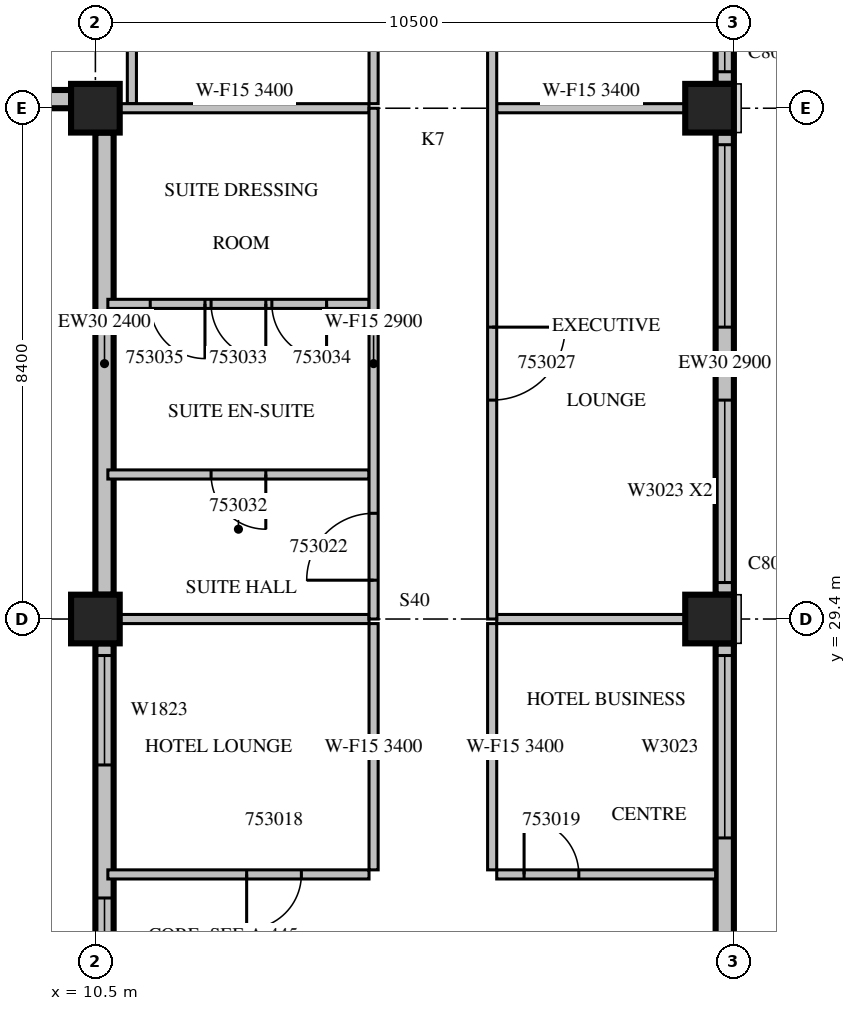
"""IFC4 building model, lengths in metres.
Left out: names, types, materials, properties, quantities, classifications, styles, units other than length and angle.
Written with IfcOpenShell. Run it as: python <this file> out.ifc"""

import sys

from ifc_helpers import new_model, si_unit, direction, frame, frame_2d, origin, origin_2d, place, context, subcontext, project, spatial, rectangle, extrude, source, transform, mapped, element, fill, save


model = new_model("IFC4")
c1 = context("Model", 3, precision=1e-05, world=origin(), true_north=direction((0.0, 1.0)))
c2 = subcontext(c1, "Body", "Model", "MODEL_VIEW")
j1 = project(units=[si_unit("LENGTHUNIT", "METRE"), si_unit("PLANEANGLEUNIT", "RADIAN")], contexts=[c1])
p1 = place(None, origin())
s1 = spatial("IfcSite", under=j1, at=p1, CompositionType="ELEMENT")
p2 = place(p1, origin())
s2 = spatial("IfcBuilding", under=s1, at=p2, CompositionType="ELEMENT")
p3 = place(p2, frame((0.0, 0.0, 234.8)))
s3 = spatial("IfcBuildingStorey", under=s2, at=p3, CompositionType="ELEMENT", Elevation=234.8)
m1 = source(origin(), c2, "Body", "SweptSolid", [
    extrude(rectangle(XDim=0.8, YDim=0.8, at=origin_2d()), origin(), (0.0, 0.0, 1.0), 3.8),
])
for number, where, z_axis, x_axis in (
    (1, (10.5, 29.4, 0.0), (0.0, 0.0, 1.0), (1.0, 0.0, 0.0)),
    (2, (20.6, 29.4, 0.0), (0.0, 0.0, 1.0), (1.0, 0.0, 0.0)),
    (3, (10.5, 37.8, 0.0), (0.0, 0.0, 1.0), (1.0, 0.0, 0.0)),
    (4, (20.6, 37.8, 0.0), (0.0, 0.0, 1.0), (1.0, 0.0, 0.0)),
):
    element("IfcColumn", number, at=place(p3, frame(where, z_axis=z_axis, x_axis=x_axis)), inside=s3, PredefinedType="COLUMN", context=c2, shape_type="MappedRepresentation", body=[
        mapped(m1, transform((0.0, 0.0, 0.0), scale=1.0)),
    ])
m2 = source(origin(), c2, "Body", "SweptSolid", [
    extrude(rectangle(XDim=7.2, YDim=0.3, at=frame_2d((3.6, 0.0))), origin(), (0.0, 0.0, 1.0), 3.4),
])
p4 = place(p3, frame((20.85, 21.8, 0.0), z_axis=(0.0, 0.0, 1.0), x_axis=(0.0, 1.0, 0.0)))
e5 = element("IfcWall", 5, at=p4, inside=s3, PredefinedType="STANDARD", context=c2, shape_type="MappedRepresentation", body=[
    mapped(m2, transform((0.0, 0.0, 0.0), scale=1.0)),
])
m3 = source(origin(), c2, "Body", "SweptSolid", [
    extrude(rectangle(XDim=1.8, YDim=2.3, at=frame_2d((0.9, 1.15))), frame((0.0, 0.16, 0.0), z_axis=(0.0, -1.0, 0.0), x_axis=(1.0, 0.0, 0.0)), (0.0, 0.0, 1.0), 0.32),
])
p5 = place(p4, frame((0.4, 0.0, 0.6)))
e6 = element("IfcOpeningElement", 6, at=p5, cuts=e5, PredefinedType="OPENING", context=c2, shape_type="MappedRepresentation", body=[
    mapped(m3, transform((0.0, 0.0, 0.0), scale=1.0)),
])
m4 = source(origin(), c2, "Body", "SweptSolid", [
    extrude(rectangle(XDim=3.0, YDim=2.3, at=frame_2d((1.5, 1.15))), frame((0.0, 0.16, 0.0), z_axis=(0.0, -1.0, 0.0), x_axis=(1.0, 0.0, 0.0)), (0.0, 0.0, 1.0), 0.32),
])
p6 = place(p4, frame((4.0, 0.0, 0.6)))
e7 = element("IfcOpeningElement", 7, at=p6, cuts=e5, PredefinedType="OPENING", context=c2, shape_type="MappedRepresentation", body=[
    mapped(m4, transform((0.0, 0.0, 0.0), scale=1.0)),
])
m5 = source(origin(), c2, "Body", "SweptSolid", [
    extrude(rectangle(XDim=7.6, YDim=0.3, at=frame_2d((3.8, 0.0))), origin(), (0.0, 0.0, 1.0), 2.9),
])
p7 = place(p3, frame((20.85, 29.8, 0.0), z_axis=(0.0, 0.0, 1.0), x_axis=(0.0, 1.0, 0.0)))
e8 = element("IfcWall", 8, at=p7, inside=s3, PredefinedType="STANDARD", context=c2, shape_type="MappedRepresentation", body=[
    mapped(m5, transform((0.0, 0.0, 0.0), scale=1.0)),
])
p8 = place(p7, frame((0.2, 0.0, 0.6)))
e9 = element("IfcOpeningElement", 9, at=p8, cuts=e8, PredefinedType="OPENING", context=c2, shape_type="MappedRepresentation", body=[
    mapped(m4, transform((0.0, 0.0, 0.0), scale=1.0)),
])
p9 = place(p7, frame((4.4, 0.0, 0.6)))
e10 = element("IfcOpeningElement", 10, at=p9, cuts=e8, PredefinedType="OPENING", context=c2, shape_type="MappedRepresentation", body=[
    mapped(m4, transform((0.0, 0.0, 0.0), scale=1.0)),
])
m6 = source(origin(), c2, "Body", "SweptSolid", [
    extrude(rectangle(XDim=7.6, YDim=0.3, at=frame_2d((3.8, 0.0))), origin(), (0.0, 0.0, 1.0), 3.4),
])
p10 = place(p3, frame((20.85, 38.2, 0.0), z_axis=(0.0, 0.0, 1.0), x_axis=(0.0, 1.0, 0.0)))
e11 = element("IfcWall", 11, at=p10, inside=s3, PredefinedType="STANDARD", context=c2, shape_type="MappedRepresentation", body=[
    mapped(m6, transform((0.0, 0.0, 0.0), scale=1.0)),
])
p11 = place(p10, frame((0.2, 0.0, 0.6)))
e12 = element("IfcOpeningElement", 12, at=p11, cuts=e11, PredefinedType="OPENING", context=c2, shape_type="MappedRepresentation", body=[
    mapped(m4, transform((0.0, 0.0, 0.0), scale=1.0)),
])
p12 = place(p10, frame((4.4, 0.0, 0.6)))
e13 = element("IfcOpeningElement", 13, at=p12, cuts=e11, PredefinedType="OPENING", context=c2, shape_type="MappedRepresentation", body=[
    mapped(m4, transform((0.0, 0.0, 0.0), scale=1.0)),
])
m7 = source(origin(), c2, "Body", "SweptSolid", [
    extrude(rectangle(XDim=1.4, YDim=0.3, at=frame_2d((0.7, 0.0))), origin(), (0.0, 0.0, 1.0), 3.4),
])
p13 = place(p3, frame((8.7, 37.95, 0.0), z_axis=(0.0, 0.0, 1.0), x_axis=(1.0, 0.0, 0.0)))
e14 = element("IfcWall", 14, at=p13, inside=s3, PredefinedType="STANDARD", context=c2, shape_type="MappedRepresentation", body=[
    mapped(m7, transform((0.0, 0.0, 0.0), scale=1.0)),
])
p14 = place(p3, frame((10.65, 37.4, 0.0), z_axis=(0.0, 0.0, 1.0), x_axis=(0.0, -1.0, 0.0)))
e15 = element("IfcWall", 15, at=p14, inside=s3, PredefinedType="STANDARD", context=c2, shape_type="SweptSolid", body=[
    extrude(rectangle(XDim=7.6, YDim=0.3, at=frame_2d((3.8, 0.0))), origin(), (0.0, 0.0, 1.0), 2.4),
])
p15 = place(p3, frame((10.65, 29.0, 0.0), z_axis=(0.0, 0.0, 1.0), x_axis=(0.0, -1.0, 0.0)))
e16 = element("IfcWall", 16, at=p15, inside=s3, PredefinedType="STANDARD", context=c2, shape_type="MappedRepresentation", body=[
    mapped(m2, transform((0.0, 0.0, 0.0), scale=1.0)),
])
p16 = place(p15, frame((0.2, 0.0, 0.6)))
e17 = element("IfcOpeningElement", 17, at=p16, cuts=e16, PredefinedType="OPENING", context=c2, shape_type="MappedRepresentation", body=[
    mapped(m3, transform((0.0, 0.0, 0.0), scale=1.0)),
])
m8 = source(origin(), c2, "Body", "SweptSolid", [
    extrude(rectangle(XDim=2.4, YDim=2.3, at=frame_2d((1.2, 1.15))), frame((0.0, 0.16, 0.0), z_axis=(0.0, -1.0, 0.0), x_axis=(1.0, 0.0, 0.0)), (0.0, 0.0, 1.0), 0.32),
])
p17 = place(p15, frame((4.188, 0.0, 0.6)))
e18 = element("IfcOpeningElement", 18, at=p17, cuts=e16, PredefinedType="OPENING", context=c2, shape_type="MappedRepresentation", body=[
    mapped(m8, transform((0.0, 0.0, 0.0), scale=1.0)),
])
m9 = source(origin(), c2, "Body", "SweptSolid", [
    extrude(rectangle(XDim=4.295, YDim=0.15, at=frame_2d((2.147, 0.0))), origin(), (0.0, 0.0, 1.0), 3.4),
])
p18 = place(p3, frame((10.705, 25.2, 0.0), z_axis=(0.0, 0.0, 1.0), x_axis=(1.0, 0.0, 0.0)))
e19 = element("IfcWall", 19, at=p18, inside=s3, PredefinedType="PARTITIONING", context=c2, shape_type="MappedRepresentation", body=[
    mapped(m9, transform((0.0, 0.0, 0.0), scale=1.0)),
])
m10 = source(origin(), c2, "Body", "SweptSolid", [
    extrude(rectangle(XDim=0.9, YDim=2.1, at=frame_2d((0.45, 1.05))), frame((0.0, 0.085, 0.0), z_axis=(0.0, -1.0, 0.0), x_axis=(1.0, 0.0, 0.0)), (0.0, 0.0, 1.0), 0.17),
])
p19 = place(p18, frame((2.283, 0.0, 0.0)))
e20 = element("IfcOpeningElement", 20, at=p19, cuts=e19, PredefinedType="OPENING", context=c2, shape_type="MappedRepresentation", body=[
    mapped(m10, transform((0.0, 0.0, 0.0), scale=1.0)),
])
m11 = source(origin(), c2, "Body", "SweptSolid", [
    extrude(rectangle(XDim=3.6, YDim=0.15, at=frame_2d((1.8, 0.0))), origin(), (0.0, 0.0, 1.0), 3.4),
])
p20 = place(p3, frame((17.1, 25.2, 0.0), z_axis=(0.0, 0.0, 1.0), x_axis=(1.0, 0.0, 0.0)))
e21 = element("IfcWall", 21, at=p20, inside=s3, PredefinedType="PARTITIONING", context=c2, shape_type="MappedRepresentation", body=[
    mapped(m11, transform((0.0, 0.0, 0.0), scale=1.0)),
])
p21 = place(p20, frame((0.45, 0.0, 0.0)))
e22 = element("IfcOpeningElement", 22, at=p21, cuts=e21, PredefinedType="OPENING", context=c2, shape_type="MappedRepresentation", body=[
    mapped(m10, transform((0.0, 0.0, 0.0), scale=1.0)),
])
m12 = source(origin(), c2, "Body", "SweptSolid", [
    extrude(rectangle(XDim=4.05, YDim=0.15, at=frame_2d((2.025, 0.0))), origin(), (0.0, 0.0, 1.0), 3.4),
])
for number, where, z_axis, x_axis in (
    (23, (15.075, 25.275, 0.0), (0.0, 0.0, 1.0), (0.0, 1.0, 0.0)),
    (24, (17.025, 29.325, 0.0), (0.0, 0.0, 1.0), (0.0, -1.0, 0.0)),
):
    element("IfcWall", number, at=place(p3, frame(where, z_axis=z_axis, x_axis=x_axis)), inside=s3, PredefinedType="PARTITIONING", context=c2, shape_type="MappedRepresentation", body=[
        mapped(m12, transform((0.0, 0.0, 0.0), scale=1.0)),
    ])
m13 = source(origin(), c2, "Body", "SweptSolid", [
    extrude(rectangle(XDim=4.101, YDim=0.15, at=frame_2d((2.05, 0.0))), origin(), (0.0, 0.0, 1.0), 3.4),
])
p22 = place(p3, frame((15.0, 29.4, 0.0), z_axis=(0.0, 0.0, 1.0), x_axis=(-1.0, 0.0, 0.0)))
e25 = element("IfcWall", 25, at=p22, inside=s3, PredefinedType="PARTITIONING", context=c2, shape_type="MappedRepresentation", body=[
    mapped(m13, transform((0.0, 0.0, 0.0), scale=1.0)),
])
m14 = source(origin(), c2, "Body", "SweptSolid", [
    extrude(rectangle(XDim=3.101, YDim=0.15, at=frame_2d((1.55, 0.0))), origin(), (0.0, 0.0, 1.0), 3.4),
])
p23 = place(p3, frame((20.201, 29.4, 0.0), z_axis=(0.0, 0.0, 1.0), x_axis=(-1.0, 0.0, 0.0)))
e26 = element("IfcWall", 26, at=p23, inside=s3, PredefinedType="PARTITIONING", context=c2, shape_type="MappedRepresentation", body=[
    mapped(m14, transform((0.0, 0.0, 0.0), scale=1.0)),
])
m15 = source(origin(), c2, "Body", "SweptSolid", [
    extrude(rectangle(XDim=6.45, YDim=0.15, at=frame_2d((3.225, 0.0))), origin(), (0.0, 0.0, 1.0), 3.4),
])
p24 = place(p3, frame((11.1, 44.325, 0.0), z_axis=(0.0, 0.0, 1.0), x_axis=(0.0, -1.0, 0.0)))
e27 = element("IfcWall", 27, at=p24, inside=s3, PredefinedType="PARTITIONING", context=c2, shape_type="MappedRepresentation", body=[
    mapped(m15, transform((0.0, 0.0, 0.0), scale=1.0)),
])
p25 = place(p3, frame((15.075, 37.875, 0.0), z_axis=(0.0, 0.0, 1.0), x_axis=(0.0, 1.0, 0.0)))
e28 = element("IfcWall", 28, at=p25, inside=s3, PredefinedType="PARTITIONING", context=c2, shape_type="MappedRepresentation", body=[
    mapped(m15, transform((0.0, 0.0, 0.0), scale=1.0)),
])
p26 = place(p25, frame((2.737, 0.0, 0.0)))
e29 = element("IfcOpeningElement", 29, at=p26, cuts=e28, PredefinedType="OPENING", context=c2, shape_type="MappedRepresentation", body=[
    mapped(m10, transform((0.0, 0.0, 0.0), scale=1.0)),
])
p27 = place(p3, frame((15.0, 31.777, 0.0), z_axis=(0.0, 0.0, 1.0), x_axis=(-1.0, 0.0, 0.0)))
e30 = element("IfcWall", 30, at=p27, inside=s3, PredefinedType="PARTITIONING", context=c2, shape_type="MappedRepresentation", body=[
    mapped(m9, transform((0.0, 0.0, 0.0), scale=1.0)),
])
p28 = place(p27, frame((1.698, 0.0, 0.0)))
e31 = element("IfcOpeningElement", 31, at=p28, cuts=e30, PredefinedType="OPENING", context=c2, shape_type="MappedRepresentation", body=[
    mapped(m10, transform((0.0, 0.0, 0.0), scale=1.0)),
])
p29 = place(p3, frame((15.0, 34.583, 0.0), z_axis=(0.0, 0.0, 1.0), x_axis=(-1.0, 0.0, 0.0)))
e32 = element("IfcWall", 32, at=p29, inside=s3, PredefinedType="PARTITIONING", context=c2, shape_type="MappedRepresentation", body=[
    mapped(m9, transform((0.0, 0.0, 0.0), scale=1.0)),
])
p30 = place(p29, frame((1.698, 0.0, 0.0)))
e33 = element("IfcOpeningElement", 33, at=p30, cuts=e32, PredefinedType="OPENING", context=c2, shape_type="MappedRepresentation", body=[
    mapped(m10, transform((0.0, 0.0, 0.0), scale=1.0)),
])
p31 = place(p29, frame((0.698, 0.0, 0.0)))
e34 = element("IfcOpeningElement", 34, at=p31, cuts=e32, PredefinedType="OPENING", context=c2, shape_type="MappedRepresentation", body=[
    mapped(m10, transform((0.0, 0.0, 0.0), scale=1.0)),
])
p32 = place(p29, frame((2.698, 0.0, 0.0)))
e35 = element("IfcOpeningElement", 35, at=p32, cuts=e32, PredefinedType="OPENING", context=c2, shape_type="MappedRepresentation", body=[
    mapped(m10, transform((0.0, 0.0, 0.0), scale=1.0)),
])
p33 = place(p3, frame((15.0, 37.8, 0.0), z_axis=(0.0, 0.0, 1.0), x_axis=(-1.0, 0.0, 0.0)))
e36 = element("IfcWall", 36, at=p33, inside=s3, PredefinedType="PARTITIONING", context=c2, shape_type="MappedRepresentation", body=[
    mapped(m13, transform((0.0, 0.0, 0.0), scale=1.0)),
])
p34 = place(p3, frame((20.201, 37.8, 0.0), z_axis=(0.0, 0.0, 1.0), x_axis=(-1.0, 0.0, 0.0)))
e37 = element("IfcWall", 37, at=p34, inside=s3, PredefinedType="PARTITIONING", context=c2, shape_type="MappedRepresentation", body=[
    mapped(m14, transform((0.0, 0.0, 0.0), scale=1.0)),
])
m16 = source(origin(), c2, "Body", "SweptSolid", [
    extrude(rectangle(XDim=8.4, YDim=0.15, at=frame_2d((4.2, 0.0))), origin(), (0.0, 0.0, 1.0), 2.9),
])
p35 = place(p3, frame((15.075, 29.4, 0.0), z_axis=(0.0, 0.0, 1.0), x_axis=(0.0, 1.0, 0.0)))
e38 = element("IfcWall", 38, at=p35, inside=s3, PredefinedType="PARTITIONING", context=c2, shape_type="MappedRepresentation", body=[
    mapped(m16, transform((0.0, 0.0, 0.0), scale=1.0)),
])
m17 = source(origin(), c2, "Body", "SweptSolid", [
    extrude(rectangle(XDim=1.1, YDim=2.1, at=frame_2d((0.55, 1.05))), frame((0.0, 0.085, 0.0), z_axis=(0.0, -1.0, 0.0), x_axis=(1.0, 0.0, 0.0)), (0.0, 0.0, 1.0), 0.17),
])
p36 = place(p35, frame((0.638, 0.0, 0.0)))
e39 = element("IfcOpeningElement", 39, at=p36, cuts=e38, PredefinedType="OPENING", context=c2, shape_type="MappedRepresentation", body=[
    mapped(m17, transform((0.0, 0.0, 0.0), scale=1.0)),
])
m18 = source(origin(), c2, "Body", "SweptSolid", [
    extrude(rectangle(XDim=19.86, YDim=0.15, at=frame_2d((9.93, 0.0))), origin(), (0.0, 0.0, 1.0), 2.9),
])
p37 = place(p3, frame((17.025, 49.26, 0.0), z_axis=(0.0, 0.0, 1.0), x_axis=(0.0, -1.0, 0.0)))
e40 = element("IfcWall", 40, at=p37, inside=s3, PredefinedType="PARTITIONING", context=c2, shape_type="MappedRepresentation", body=[
    mapped(m18, transform((0.0, 0.0, 0.0), scale=1.0)),
])
m19 = source(origin(), c2, "Body", "SweptSolid", [
    extrude(rectangle(XDim=1.2, YDim=2.1, at=frame_2d((0.6, 1.05))), frame((0.0, 0.085, 0.0), z_axis=(0.0, -1.0, 0.0), x_axis=(1.0, 0.0, 0.0)), (0.0, 0.0, 1.0), 0.17),
])
p38 = place(p37, frame((15.06, 0.0, 0.0)))
e41 = element("IfcOpeningElement", 41, at=p38, cuts=e40, PredefinedType="OPENING", context=c2, shape_type="MappedRepresentation", body=[
    mapped(m19, transform((0.0, 0.0, 0.0), scale=1.0)),
])
m20 = source(origin(), c2, "Body", "SweptSolid", [
    extrude(rectangle(XDim=1.0, YDim=2.1, at=frame_2d((0.5, 1.05))), frame((0.0, 0.085, 0.0), z_axis=(0.0, -1.0, 0.0), x_axis=(1.0, 0.0, 0.0)), (0.0, 0.0, 1.0), 0.17),
])
p39 = place(p37, frame((8.86, 0.0, 0.0)))
e42 = element("IfcOpeningElement", 42, at=p39, cuts=e40, PredefinedType="OPENING", context=c2, shape_type="MappedRepresentation", body=[
    mapped(m20, transform((0.0, 0.0, 0.0), scale=1.0)),
])
p40 = place(p37, frame((3.092, 0.0, 0.0)))
e43 = element("IfcOpeningElement", 43, at=p40, cuts=e40, PredefinedType="OPENING", context=c2, shape_type="MappedRepresentation", body=[
    mapped(m20, transform((0.0, 0.0, 0.0), scale=1.0)),
])
m21 = source(origin(), c2, "Body", "SweptSolid", [
    extrude(rectangle(XDim=3.0, YDim=2.3, at=frame_2d((1.5, 1.15))), frame((0.0, 0.03, 0.0), z_axis=(0.0, -1.0, 0.0), x_axis=(1.0, 0.0, 0.0)), (0.0, 0.0, 1.0), 0.06),
])
p41 = place(p6, origin())
e44 = element("IfcWindow", 44, at=p41, inside=s3, PartitioningType="SINGLE_PANEL", PredefinedType="WINDOW", context=c2, shape_type="MappedRepresentation", body=[
    mapped(m21, transform((0.0, 0.0, 0.0), scale=1.0)),
])
fill(e7, e44)
p42 = place(p8, origin())
e45 = element("IfcWindow", 45, at=p42, inside=s3, PartitioningType="SINGLE_PANEL", PredefinedType="WINDOW", context=c2, shape_type="MappedRepresentation", body=[
    mapped(m21, transform((0.0, 0.0, 0.0), scale=1.0)),
])
fill(e9, e45)
p43 = place(p9, origin())
e46 = element("IfcWindow", 46, at=p43, inside=s3, PartitioningType="SINGLE_PANEL", PredefinedType="WINDOW", context=c2, shape_type="MappedRepresentation", body=[
    mapped(m21, transform((0.0, 0.0, 0.0), scale=1.0)),
])
fill(e10, e46)
p44 = place(p11, origin())
e47 = element("IfcWindow", 47, at=p44, inside=s3, PartitioningType="SINGLE_PANEL", PredefinedType="WINDOW", context=c2, shape_type="MappedRepresentation", body=[
    mapped(m21, transform((0.0, 0.0, 0.0), scale=1.0)),
])
fill(e12, e47)
m22 = source(origin(), c2, "Body", "SweptSolid", [
    extrude(rectangle(XDim=1.8, YDim=2.3, at=frame_2d((0.9, 1.15))), frame((0.0, 0.03, 0.0), z_axis=(0.0, -1.0, 0.0), x_axis=(1.0, 0.0, 0.0)), (0.0, 0.0, 1.0), 0.06),
])
p45 = place(p16, origin())
e48 = element("IfcWindow", 48, at=p45, inside=s3, PartitioningType="SINGLE_PANEL", PredefinedType="WINDOW", context=c2, shape_type="MappedRepresentation", body=[
    mapped(m22, transform((0.0, 0.0, 0.0), scale=1.0)),
])
fill(e17, e48)
m23 = source(origin(), c2, "Body", "SweptSolid", [
    extrude(rectangle(XDim=2.4, YDim=2.3, at=frame_2d((1.2, 1.15))), frame((0.0, 0.03, 0.0), z_axis=(0.0, -1.0, 0.0), x_axis=(1.0, 0.0, 0.0)), (0.0, 0.0, 1.0), 0.06),
])
p46 = place(p17, origin())
e49 = element("IfcWindow", 49, at=p46, inside=s3, PartitioningType="SINGLE_PANEL", PredefinedType="WINDOW", context=c2, shape_type="MappedRepresentation", body=[
    mapped(m23, transform((0.0, 0.0, 0.0), scale=1.0)),
])
fill(e18, e49)
m24 = source(origin(), c2, "Body", "SweptSolid", [
    extrude(rectangle(XDim=0.9, YDim=2.1, at=frame_2d((0.45, 1.05))), frame((0.0, 0.025, 0.0), z_axis=(0.0, -1.0, 0.0), x_axis=(1.0, 0.0, 0.0)), (0.0, 0.0, 1.0), 0.05),
])
p47 = place(p19, origin())
e50 = element("IfcDoor", 50, at=p47, inside=s3, OperationType="SINGLE_SWING_RIGHT", PredefinedType="DOOR", context=c2, shape_type="MappedRepresentation", body=[
    mapped(m24, transform((0.0, 0.0, 0.0), scale=1.0)),
])
fill(e20, e50)
p48 = place(p21, origin())
e51 = element("IfcDoor", 51, at=p48, inside=s3, OperationType="SINGLE_SWING_LEFT", PredefinedType="DOOR", context=c2, shape_type="MappedRepresentation", body=[
    mapped(m24, transform((0.0, 0.0, 0.0), scale=1.0)),
])
fill(e22, e51)
m25 = source(origin(), c2, "Body", "SweptSolid", [
    extrude(rectangle(XDim=1.1, YDim=2.1, at=frame_2d((0.55, 1.05))), frame((0.0, 0.025, 0.0), z_axis=(0.0, -1.0, 0.0), x_axis=(1.0, 0.0, 0.0)), (0.0, 0.0, 1.0), 0.05),
])
p49 = place(p36, origin())
e52 = element("IfcDoor", 52, at=p49, inside=s3, OperationType="SINGLE_SWING_LEFT", PredefinedType="DOOR", context=c2, shape_type="MappedRepresentation", body=[
    mapped(m25, transform((0.0, 0.0, 0.0), scale=1.0)),
])
fill(e39, e52)
m26 = source(origin(), c2, "Body", "SweptSolid", [
    extrude(rectangle(XDim=1.2, YDim=2.1, at=frame_2d((0.6, 1.05))), frame((0.0, 0.025, 0.0), z_axis=(0.0, -1.0, 0.0), x_axis=(1.0, 0.0, 0.0)), (0.0, 0.0, 1.0), 0.05),
])
p50 = place(p38, origin())
e53 = element("IfcDoor", 53, at=p50, inside=s3, OperationType="SINGLE_SWING_LEFT", PredefinedType="DOOR", context=c2, shape_type="MappedRepresentation", body=[
    mapped(m26, transform((0.0, 0.0, 0.0), scale=1.0)),
])
fill(e41, e53)
p51 = place(p28, origin())
e54 = element("IfcDoor", 54, at=p51, inside=s3, OperationType="SINGLE_SWING_LEFT", PredefinedType="DOOR", context=c2, shape_type="MappedRepresentation", body=[
    mapped(m24, transform((0.0, 0.0, 0.0), scale=1.0)),
])
fill(e31, e54)
p52 = place(p30, origin())
e55 = element("IfcDoor", 55, at=p52, inside=s3, OperationType="SINGLE_SWING_LEFT", PredefinedType="DOOR", context=c2, shape_type="MappedRepresentation", body=[
    mapped(m24, transform((0.0, 0.0, 0.0), scale=1.0)),
])
fill(e33, e55)
p53 = place(p31, origin())
e56 = element("IfcDoor", 56, at=p53, inside=s3, OperationType="SINGLE_SWING_LEFT", PredefinedType="DOOR", context=c2, shape_type="MappedRepresentation", body=[
    mapped(m24, transform((0.0, 0.0, 0.0), scale=1.0)),
])
fill(e34, e56)
p54 = place(p32, origin())
e57 = element("IfcDoor", 57, at=p54, inside=s3, OperationType="SINGLE_SWING_LEFT", PredefinedType="DOOR", context=c2, shape_type="MappedRepresentation", body=[
    mapped(m24, transform((0.0, 0.0, 0.0), scale=1.0)),
])
fill(e35, e57)
save(model, sys.argv[1])
